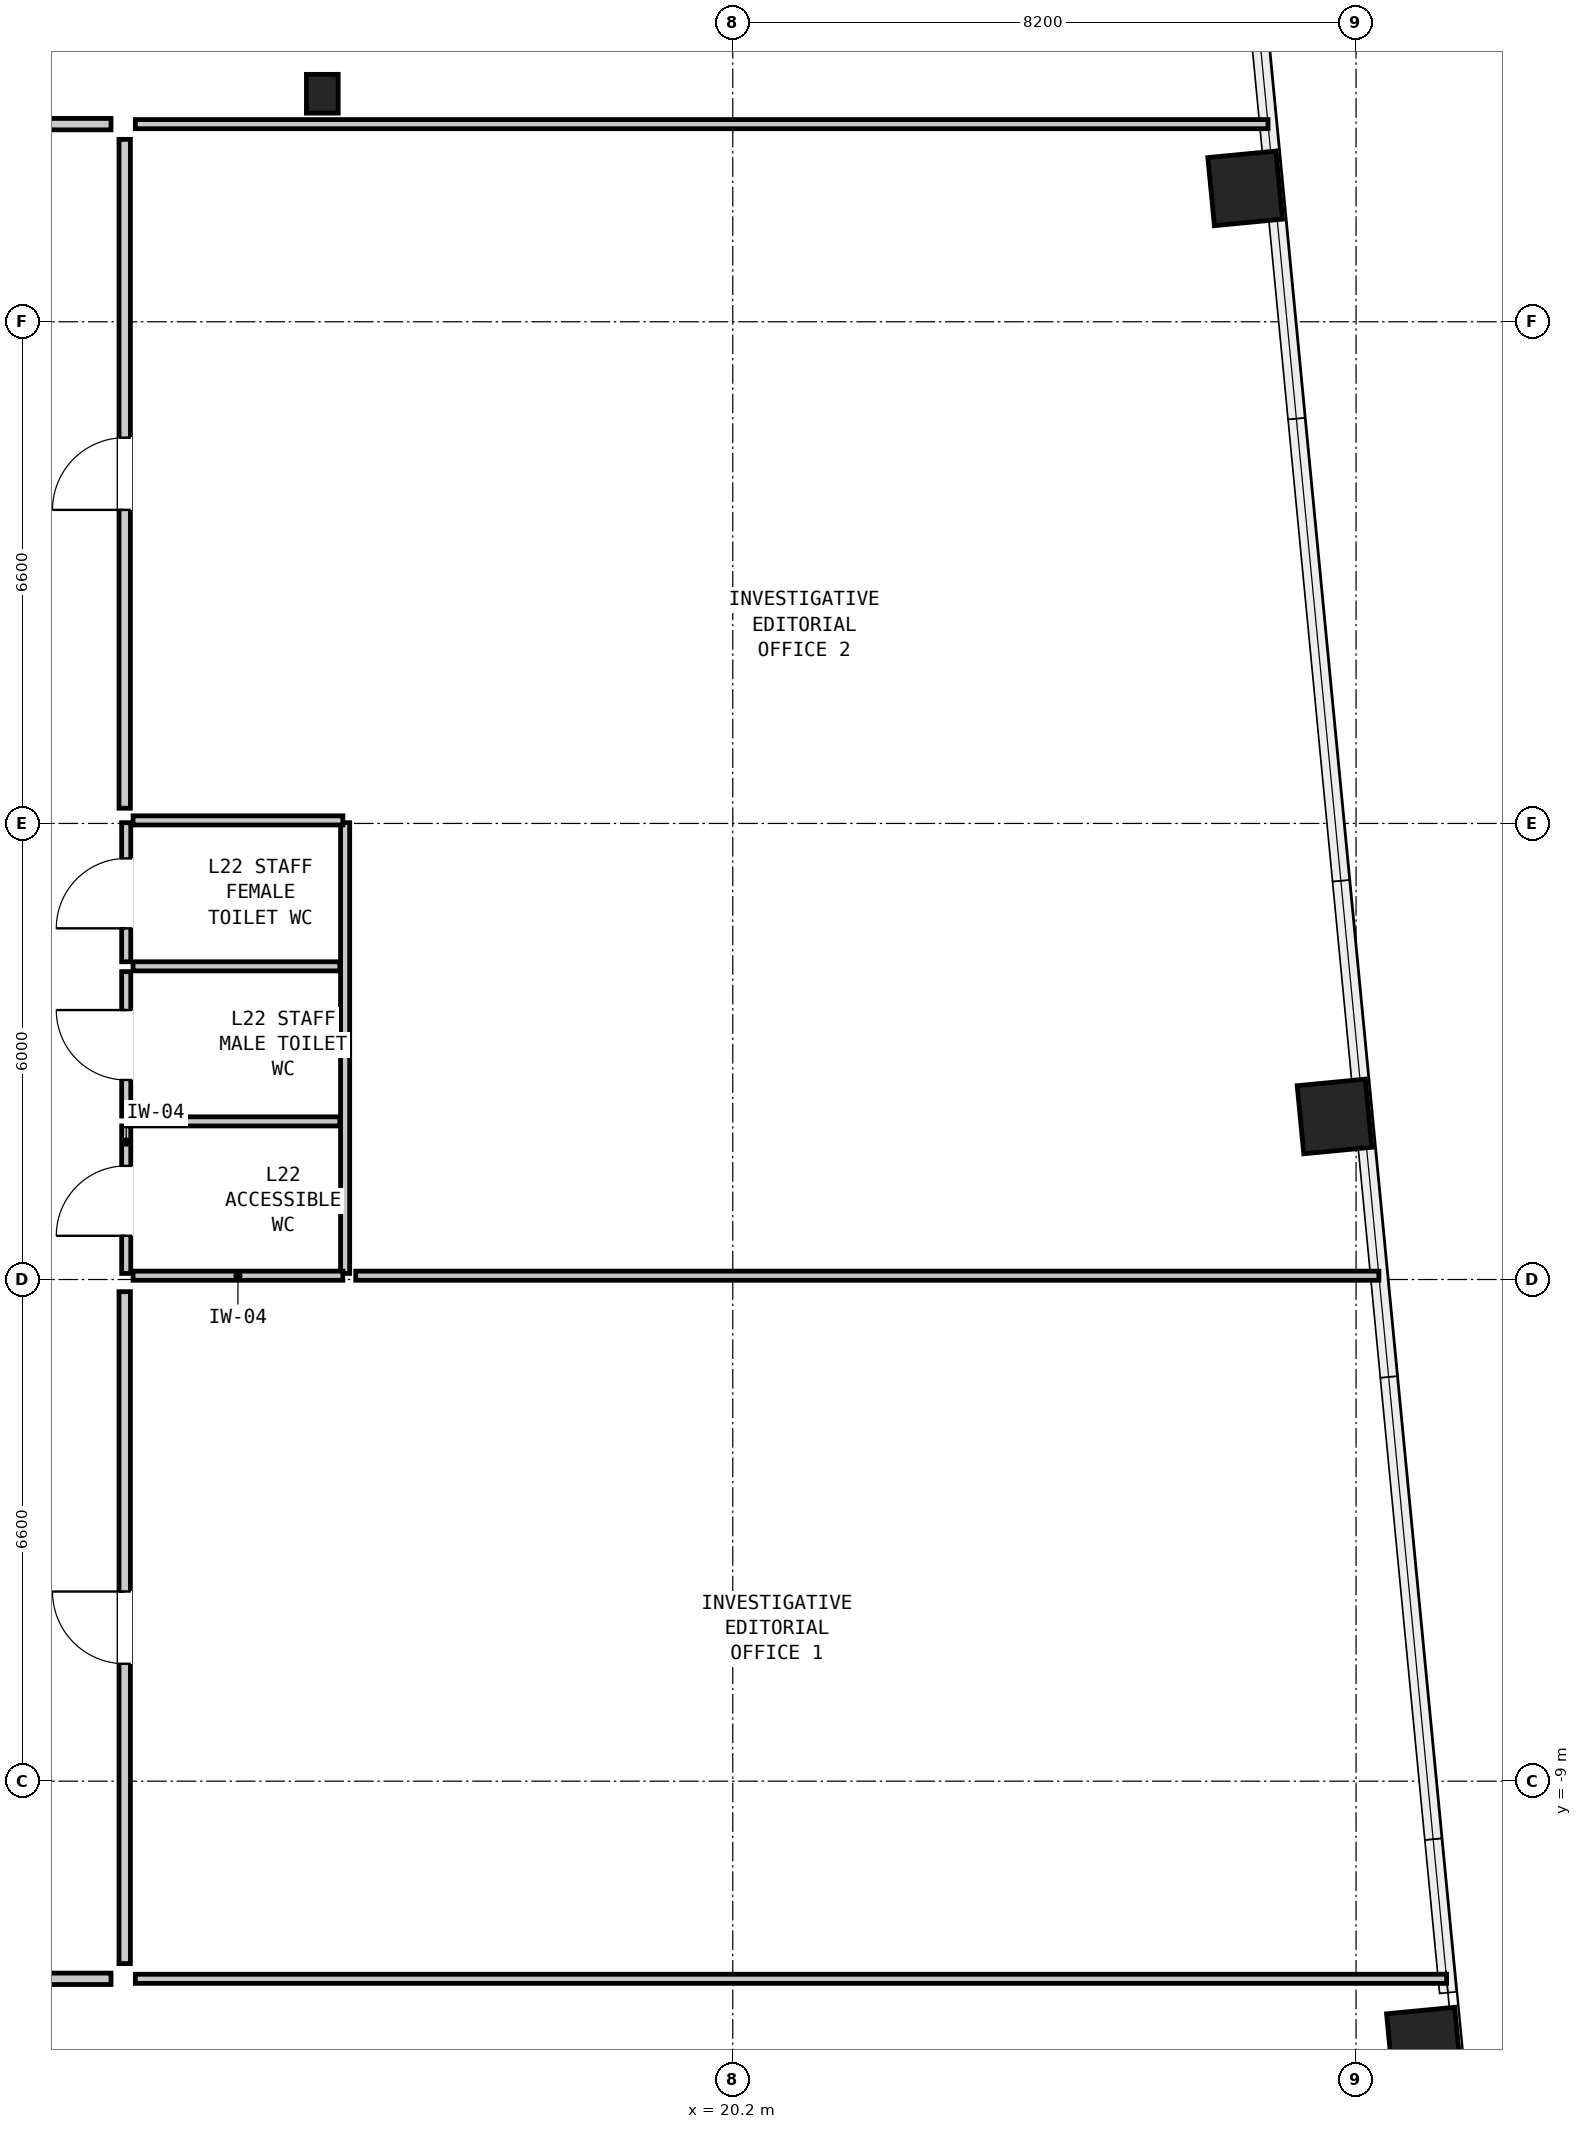
"""IFC4 building model, lengths in metres.
Left out: names, types, materials, properties, quantities, classifications, styles, units other than length and angle.
Written with IfcOpenShell. Run it as: python <this file> out.ifc"""

import sys

from ifc_helpers import new_model, si_unit, direction, frame, frame_2d, origin, origin_2d, place, context, subcontext, project, spatial, rectangle, hollow_rectangle, i_section, extrude, element, fill, save


model = new_model("IFC4")
c1 = context("Model", 3, precision=1e-05, world=origin(), true_north=direction((0.0, 1.0)))
c2 = subcontext(c1, "Body", "Model", "MODEL_VIEW")
j1 = project(units=[si_unit("LENGTHUNIT", "METRE"), si_unit("PLANEANGLEUNIT", "RADIAN")], contexts=[c1])
p1 = place(None, origin())
s1 = spatial("IfcSite", under=j1, at=p1, CompositionType="ELEMENT")
p2 = place(p1, origin())
s2 = spatial("IfcBuilding", under=s1, at=p2, CompositionType="ELEMENT")
p3 = place(p2, frame((0.0, 0.0, 78.6)))
s3 = spatial("IfcBuildingStorey", under=s2, at=p3, CompositionType="ELEMENT", Elevation=78.6)
for number, where, z_axis, x_axis in (
    (1, (29.292, -12.465, 0.0), (0.0, 0.0, 1.0), (-0.096, 0.995, 0.0)),
    (2, (28.117, -0.255, 0.0), (0.0, 0.0, 1.0), (-0.096, 0.995, 0.0)),
    (3, (26.941, 11.955, 0.0), (0.0, 0.0, 1.0), (-0.096, 0.995, 0.0)),
):
    element("IfcColumn", number, at=place(p3, frame(where, z_axis=z_axis, x_axis=x_axis)), inside=s3, PredefinedType="COLUMN", context=c2, shape_type="SweptSolid", body=[
        extrude(hollow_rectangle(XDim=0.9, YDim=0.9, WallThickness=0.055, at=origin_2d()), origin(), (0.0, 0.0, 1.0), 3.05),
    ])
p4 = place(p3, frame((14.8, 13.2, 0.0), z_axis=(0.0, 0.0, 1.0), x_axis=(1.0, 0.0, 0.0)))
e4 = element("IfcColumn", 4, at=p4, inside=s3, PredefinedType="COLUMN", context=c2, shape_type="SweptSolid", body=[
    extrude(i_section(OverallWidth=0.418, OverallDepth=0.51, WebThickness=0.042, FlangeThickness=0.068, at=origin_2d()), origin(), (0.0, 0.0, 1.0), 3.05),
])
p5 = place(p3, frame((12.22, -2.32, 0.0), z_axis=(0.0, 0.0, 1.0), x_axis=(0.0, 1.0, 0.0)))
e5 = element("IfcWall", 5, at=p5, inside=s3, PredefinedType="PARTITIONING", context=c2, shape_type="SweptSolid", body=[
    extrude(rectangle(XDim=1.94, YDim=0.12, at=frame_2d((0.97, 0.0))), origin(), (0.0, 0.0, 1.0), 2.83),
])
p6 = place(p5, frame((0.495, 0.0, 0.0)))
e6 = element("IfcOpeningElement", 6, at=p6, cuts=e5, PredefinedType="OPENING", context=c2, shape_type="SweptSolid", body=[
    extrude(rectangle(XDim=0.92, YDim=2.1, at=frame_2d((0.46, 1.05))), frame((0.0, 0.072, 0.0), z_axis=(0.0, -1.0, 0.0), x_axis=(1.0, 0.0, 0.0)), (0.0, 0.0, 1.0), 0.144),
])
p7 = place(p3, frame((12.22, -0.25, 0.0), z_axis=(0.0, 0.0, 1.0), x_axis=(0.0, 1.0, 0.0)))
e7 = element("IfcWall", 7, at=p7, inside=s3, PredefinedType="PARTITIONING", context=c2, shape_type="SweptSolid", body=[
    extrude(rectangle(XDim=1.9, YDim=0.12, at=frame_2d((0.95, 0.0))), origin(), (0.0, 0.0, 1.0), 2.83),
])
p8 = place(p7, frame((0.475, 0.0, 0.0)))
e8 = element("IfcOpeningElement", 8, at=p8, cuts=e7, PredefinedType="OPENING", context=c2, shape_type="SweptSolid", body=[
    extrude(rectangle(XDim=0.92, YDim=2.1, at=frame_2d((0.46, 1.05))), frame((0.0, 0.072, 0.0), z_axis=(0.0, -1.0, 0.0), x_axis=(1.0, 0.0, 0.0)), (0.0, 0.0, 1.0), 0.144),
])
p9 = place(p3, frame((12.22, 1.78, 0.0), z_axis=(0.0, 0.0, 1.0), x_axis=(0.0, 1.0, 0.0)))
e9 = element("IfcWall", 9, at=p9, inside=s3, PredefinedType="PARTITIONING", context=c2, shape_type="SweptSolid", body=[
    extrude(rectangle(XDim=1.83, YDim=0.12, at=frame_2d((0.915, 0.0))), origin(), (0.0, 0.0, 1.0), 2.83),
])
p10 = place(p9, frame((0.44, 0.0, 0.0)))
e10 = element("IfcOpeningElement", 10, at=p10, cuts=e9, PredefinedType="OPENING", context=c2, shape_type="SweptSolid", body=[
    extrude(rectangle(XDim=0.92, YDim=2.1, at=frame_2d((0.46, 1.05))), frame((0.0, 0.072, 0.0), z_axis=(0.0, -1.0, 0.0), x_axis=(1.0, 0.0, 0.0)), (0.0, 0.0, 1.0), 0.144),
])
p11 = place(p3, frame((15.1, -2.32, 0.0), z_axis=(0.0, 0.0, 1.0), x_axis=(0.0, 1.0, 0.0)))
e11 = element("IfcWall", 11, at=p11, inside=s3, PredefinedType="PARTITIONING", context=c2, shape_type="SweptSolid", body=[
    extrude(rectangle(XDim=5.93, YDim=0.12, at=frame_2d((2.965, 0.0))), origin(), (0.0, 0.0, 1.0), 2.83),
])
for number, where, z_axis, x_axis in (
    (12, (12.31, -2.35, 0.0), (0.0, 0.0, 1.0), (1.0, 0.0, 0.0)),
    (13, (12.31, 3.64, 0.0), (0.0, 0.0, 1.0), (1.0, 0.0, 0.0)),
):
    element("IfcWall", number, at=place(p3, frame(where, z_axis=z_axis, x_axis=x_axis)), inside=s3, PredefinedType="PARTITIONING", context=c2, shape_type="SweptSolid", body=[
        extrude(rectangle(XDim=2.76, YDim=0.12, at=frame_2d((1.38, 0.0))), origin(), (0.0, 0.0, 1.0), 1.799),
    ])
for number, where, z_axis, x_axis in (
    (14, (12.31, -0.32, 0.0), (0.0, 0.0, 1.0), (1.0, 0.0, 0.0)),
    (15, (12.31, 1.72, 0.0), (0.0, 0.0, 1.0), (1.0, 0.0, 0.0)),
):
    element("IfcWall", number, at=place(p3, frame(where, z_axis=z_axis, x_axis=x_axis)), inside=s3, PredefinedType="PARTITIONING", context=c2, shape_type="SweptSolid", body=[
        extrude(rectangle(XDim=2.72, YDim=0.12, at=frame_2d((1.36, 0.0))), origin(), (0.0, 0.0, 1.0), 2.83),
    ])
p12 = place(p3, frame((12.34, 12.8, 0.0), z_axis=(0.0, 0.0, 1.0), x_axis=(1.0, 0.0, 0.0)))
e16 = element("IfcWall", 16, at=p12, inside=s3, PredefinedType="PARTITIONING", context=c2, shape_type="SweptSolid", body=[
    extrude(rectangle(XDim=14.902, YDim=0.12, at=frame_2d((7.451, 0.0))), origin(), (0.0, 0.0, 1.0), 2.83),
])
p13 = place(p3, frame((12.34, -11.6, 0.0), z_axis=(0.0, 0.0, 1.0), x_axis=(1.0, 0.0, 0.0)))
e17 = element("IfcWall", 17, at=p13, inside=s3, PredefinedType="PARTITIONING", context=c2, shape_type="SweptSolid", body=[
    extrude(rectangle(XDim=17.251, YDim=0.12, at=frame_2d((8.625, 0.0))), origin(), (0.0, 0.0, 1.0), 2.274),
])
p14 = place(p3, frame((15.24, -2.35, 0.0), z_axis=(0.0, 0.0, 1.0), x_axis=(1.0, 0.0, 0.0)))
e18 = element("IfcWall", 18, at=p14, inside=s3, PredefinedType="PARTITIONING", context=c2, shape_type="SweptSolid", body=[
    extrude(rectangle(XDim=13.46, YDim=0.12, at=frame_2d((6.73, 0.0))), origin(), (0.0, 0.0, 1.0), 1.799),
])
p15 = place(p3, frame((8.58, 12.8, 0.0), z_axis=(0.0, 0.0, 1.0), x_axis=(1.0, 0.0, 0.0)))
e19 = element("IfcWall", 19, at=p15, inside=s3, PredefinedType="PARTITIONING", context=c2, shape_type="SweptSolid", body=[
    extrude(rectangle(XDim=3.44, YDim=0.15, at=frame_2d((1.72, 0.0))), origin(), (0.0, 0.0, 1.0), 2.83),
])
p16 = place(p15, frame((1.245, 0.0, 0.0)))
e20 = element("IfcOpeningElement", 20, at=p16, cuts=e19, PredefinedType="OPENING", context=c2, shape_type="SweptSolid", body=[
    extrude(rectangle(XDim=0.95, YDim=2.1, at=frame_2d((0.475, 1.05))), frame((0.0, 0.087, 0.0), z_axis=(0.0, -1.0, 0.0), x_axis=(1.0, 0.0, 0.0)), (0.0, 0.0, 1.0), 0.174),
])
p17 = place(p3, frame((8.58, -11.6, 0.0), z_axis=(0.0, 0.0, 1.0), x_axis=(1.0, 0.0, 0.0)))
e21 = element("IfcWall", 21, at=p17, inside=s3, PredefinedType="PARTITIONING", context=c2, shape_type="SweptSolid", body=[
    extrude(rectangle(XDim=3.44, YDim=0.15, at=frame_2d((1.72, 0.0))), origin(), (0.0, 0.0, 1.0), 2.274),
])
p18 = place(p17, frame((1.245, 0.0, 0.0)))
e22 = element("IfcOpeningElement", 22, at=p18, cuts=e21, PredefinedType="OPENING", context=c2, shape_type="SweptSolid", body=[
    extrude(rectangle(XDim=0.95, YDim=2.1, at=frame_2d((0.475, 1.05))), frame((0.0, 0.087, 0.0), z_axis=(0.0, -1.0, 0.0), x_axis=(1.0, 0.0, 0.0)), (0.0, 0.0, 1.0), 0.174),
])
p19 = place(p3, frame((12.2, -11.4, 0.0), z_axis=(0.0, 0.0, 1.0), x_axis=(0.0, 1.0, 0.0)))
e23 = element("IfcWall", 23, at=p19, inside=s3, PredefinedType="PARTITIONING", context=c2, shape_type="SweptSolid", body=[
    extrude(rectangle(XDim=8.84, YDim=0.15, at=frame_2d((4.42, 0.0))), origin(), (0.0, 0.0, 1.0), 2.83),
])
p20 = place(p19, frame((3.945, 0.0, 0.0)))
e24 = element("IfcOpeningElement", 24, at=p20, cuts=e23, PredefinedType="OPENING", context=c2, shape_type="SweptSolid", body=[
    extrude(rectangle(XDim=0.95, YDim=2.1, at=frame_2d((0.475, 1.05))), frame((0.0, 0.087, 0.0), z_axis=(0.0, -1.0, 0.0), x_axis=(1.0, 0.0, 0.0)), (0.0, 0.0, 1.0), 0.174),
])
p21 = place(p3, frame((12.2, 3.8, 0.0), z_axis=(0.0, 0.0, 1.0), x_axis=(0.0, 1.0, 0.0)))
e25 = element("IfcWall", 25, at=p21, inside=s3, PredefinedType="PARTITIONING", context=c2, shape_type="SweptSolid", body=[
    extrude(rectangle(XDim=8.8, YDim=0.15, at=frame_2d((4.4, 0.0))), origin(), (0.0, 0.0, 1.0), 2.83),
])
p22 = place(p21, frame((3.925, 0.0, 0.0)))
e26 = element("IfcOpeningElement", 26, at=p22, cuts=e25, PredefinedType="OPENING", context=c2, shape_type="SweptSolid", body=[
    extrude(rectangle(XDim=0.95, YDim=2.1, at=frame_2d((0.475, 1.05))), frame((0.0, 0.087, 0.0), z_axis=(0.0, -1.0, 0.0), x_axis=(1.0, 0.0, 0.0)), (0.0, 0.0, 1.0), 0.174),
])
p23 = place(p6, origin())
e27 = element("IfcDoor", 27, at=p23, inside=s3, OperationType="SINGLE_SWING_LEFT", PredefinedType="DOOR", context=c2, shape_type="SweptSolid", body=[
    extrude(rectangle(XDim=0.92, YDim=2.1, at=frame_2d((0.46, 1.05))), frame((0.0, 0.025, 0.0), z_axis=(0.0, -1.0, 0.0), x_axis=(1.0, 0.0, 0.0)), (0.0, 0.0, 1.0), 0.05),
])
fill(e6, e27)
p24 = place(p8, origin())
e28 = element("IfcDoor", 28, at=p24, inside=s3, OperationType="SINGLE_SWING_RIGHT", PredefinedType="DOOR", context=c2, shape_type="SweptSolid", body=[
    extrude(rectangle(XDim=0.92, YDim=2.1, at=frame_2d((0.46, 1.05))), frame((0.0, 0.025, 0.0), z_axis=(0.0, -1.0, 0.0), x_axis=(1.0, 0.0, 0.0)), (0.0, 0.0, 1.0), 0.05),
])
fill(e8, e28)
p25 = place(p10, origin())
e29 = element("IfcDoor", 29, at=p25, inside=s3, OperationType="SINGLE_SWING_LEFT", PredefinedType="DOOR", context=c2, shape_type="SweptSolid", body=[
    extrude(rectangle(XDim=0.92, YDim=2.1, at=frame_2d((0.46, 1.05))), frame((0.0, 0.025, 0.0), z_axis=(0.0, -1.0, 0.0), x_axis=(1.0, 0.0, 0.0)), (0.0, 0.0, 1.0), 0.05),
])
fill(e10, e29)
p26 = place(p20, origin())
e30 = element("IfcDoor", 30, at=p26, inside=s3, OperationType="SINGLE_SWING_RIGHT", PredefinedType="DOOR", context=c2, shape_type="SweptSolid", body=[
    extrude(rectangle(XDim=0.95, YDim=2.1, at=frame_2d((0.475, 1.05))), frame((0.0, 0.025, 0.0), z_axis=(0.0, -1.0, 0.0), x_axis=(1.0, 0.0, 0.0)), (0.0, 0.0, 1.0), 0.05),
])
fill(e24, e30)
p27 = place(p22, origin())
e31 = element("IfcDoor", 31, at=p27, inside=s3, OperationType="SINGLE_SWING_LEFT", PredefinedType="DOOR", context=c2, shape_type="SweptSolid", body=[
    extrude(rectangle(XDim=0.95, YDim=2.1, at=frame_2d((0.475, 1.05))), frame((0.0, 0.025, 0.0), z_axis=(0.0, -1.0, 0.0), x_axis=(1.0, 0.0, 0.0)), (0.0, 0.0, 1.0), 0.05),
])
fill(e26, e31)
save(model, sys.argv[1])
